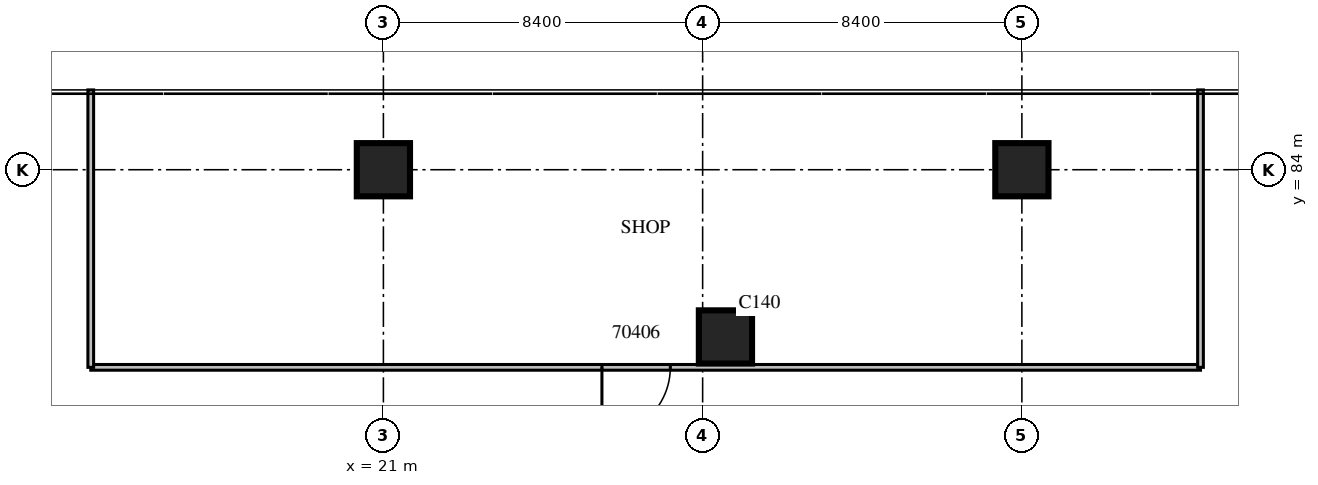
"""IFC4 building model, lengths in metres.
Left out: names, types, materials, properties, quantities, classifications, styles, units other than length and angle.
Written with IfcOpenShell. Run it as: python <this file> out.ifc"""

import sys

from ifc_helpers import new_model, si_unit, direction, frame, frame_2d, origin, origin_2d, place, context, subcontext, project, spatial, rectangle, extrude, source, transform, mapped, element, fill, save


model = new_model("IFC4")
c1 = context("Model", 3, precision=1e-05, world=origin(), true_north=direction((0.0, 1.0)))
c2 = subcontext(c1, "Body", "Model", "MODEL_VIEW")
j1 = project(units=[si_unit("LENGTHUNIT", "METRE"), si_unit("PLANEANGLEUNIT", "RADIAN")], contexts=[c1])
p1 = place(None, origin())
s1 = spatial("IfcSite", under=j1, at=p1, CompositionType="ELEMENT")
p2 = place(p1, origin())
s2 = spatial("IfcBuilding", under=s1, at=p2, CompositionType="ELEMENT")
p3 = place(p2, frame((0.0, 0.0, 7.5)))
s3 = spatial("IfcBuildingStorey", under=s2, at=p3, CompositionType="ELEMENT", Elevation=7.5)
m1 = source(origin(), c2, "Body", "SweptSolid", [
    extrude(rectangle(XDim=1.4, YDim=1.4, at=origin_2d()), origin(), (0.0, 0.0, 1.0), 5.4),
])
for number, where, z_axis, x_axis in (
    (1, (21.0, 84.0, 0.0), (0.0, 0.0, 1.0), (1.0, 0.0, 0.0)),
    (2, (30.0, 79.6, 0.0), (0.0, 0.0, 1.0), (1.0, 0.0, 0.0)),
    (3, (37.8, 84.0, 0.0), (0.0, 0.0, 1.0), (1.0, 0.0, 0.0)),
):
    element("IfcColumn", number, at=place(p3, frame(where, z_axis=z_axis, x_axis=x_axis)), inside=s3, PredefinedType="COLUMN", context=c2, shape_type="MappedRepresentation", body=[
        mapped(m1, transform((0.0, 0.0, 0.0), scale=1.0)),
    ])
m2 = source(origin(), c2, "Body", "SweptSolid", [
    extrude(rectangle(XDim=29.2, YDim=0.15, at=frame_2d((14.6, 0.0))), origin(), (0.0, 0.0, 1.0), 4.8),
])
p4 = place(p3, frame((13.3, 78.8, 0.0), z_axis=(0.0, 0.0, 1.0), x_axis=(1.0, 0.0, 0.0)))
e4 = element("IfcWall", 4, at=p4, inside=s3, PredefinedType="PARTITIONING", context=c2, shape_type="MappedRepresentation", body=[
    mapped(m2, transform((0.0, 0.0, 0.0), scale=1.0)),
])
m3 = source(origin(), c2, "Body", "SweptSolid", [
    extrude(rectangle(XDim=1.8, YDim=2.1, at=frame_2d((0.9, 1.05))), frame((0.0, 0.085, 0.0), z_axis=(0.0, -1.0, 0.0), x_axis=(1.0, 0.0, 0.0)), (0.0, 0.0, 1.0), 0.17),
])
p5 = place(p4, frame((13.45, 0.0, 0.0)))
e5 = element("IfcOpeningElement", 5, at=p5, cuts=e4, PredefinedType="OPENING", context=c2, shape_type="MappedRepresentation", body=[
    mapped(m3, transform((0.0, 0.0, 0.0), scale=1.0)),
])
m4 = source(origin(), c2, "Body", "SweptSolid", [
    extrude(rectangle(XDim=7.3, YDim=0.15, at=frame_2d((3.65, 0.0))), origin(), (0.0, 0.0, 1.0), 4.8),
])
for number, where, z_axis, x_axis in (
    (6, (13.3, 78.8, 0.0), (0.0, 0.0, 1.0), (0.0, 1.0, 0.0)),
    (7, (42.5, 78.8, 0.0), (0.0, 0.0, 1.0), (0.0, 1.0, 0.0)),
):
    element("IfcWall", number, at=place(p3, frame(where, z_axis=z_axis, x_axis=x_axis)), inside=s3, PredefinedType="PARTITIONING", context=c2, shape_type="MappedRepresentation", body=[
        mapped(m4, transform((0.0, 0.0, 0.0), scale=1.0)),
    ])
m5 = source(origin(), c2, "Body", "SweptSolid", [
    extrude(rectangle(XDim=1.8, YDim=2.1, at=frame_2d((0.9, 1.05))), frame((0.0, 0.025, 0.0), z_axis=(0.0, -1.0, 0.0), x_axis=(1.0, 0.0, 0.0)), (0.0, 0.0, 1.0), 0.05),
])
p6 = place(p5, origin())
e8 = element("IfcDoor", 8, at=p6, inside=s3, OperationType="DOUBLE_DOOR_SINGLE_SWING", PredefinedType="DOOR", context=c2, shape_type="MappedRepresentation", body=[
    mapped(m5, transform((0.0, 0.0, 0.0), scale=1.0)),
])
fill(e5, e8)
save(model, sys.argv[1])
